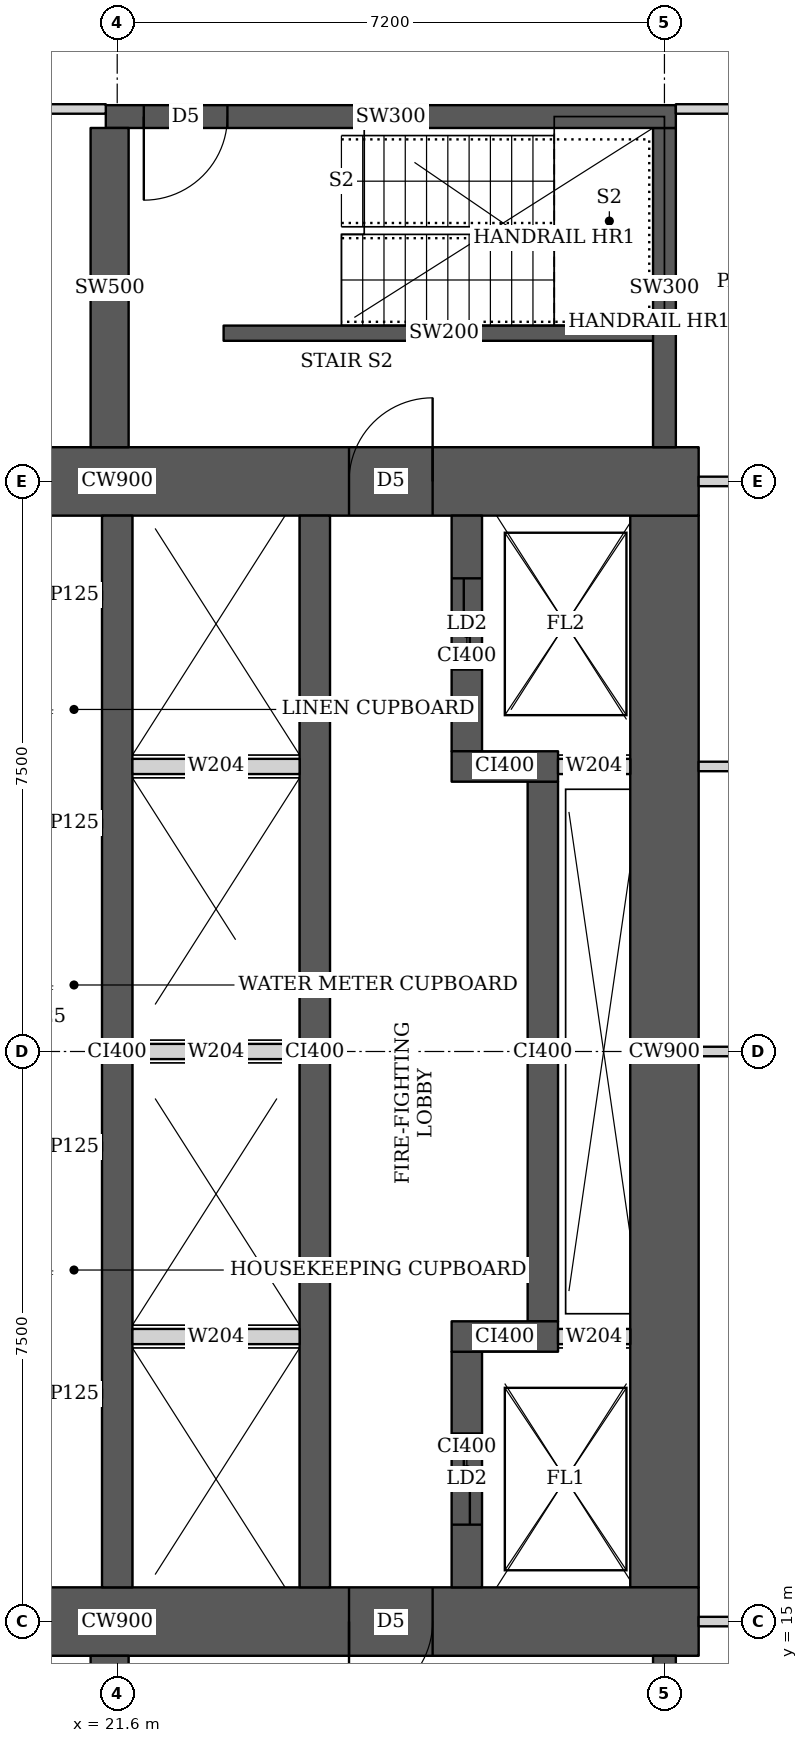
"""IFC4 building model, lengths in metres.
Left out: names, types, materials, properties, quantities, classifications, styles, units other than length and angle.
Written with IfcOpenShell. Run it as: python <this file> out.ifc"""

import sys

from ifc_helpers import new_model, si_unit, direction, frame, frame_2d, origin, place, context, subcontext, project, spatial, rectangle, extrude, element, fill, save


model = new_model("IFC4")
c1 = context("Model", 3, precision=1e-05, world=origin(), true_north=direction((0.0, 1.0)))
c2 = subcontext(c1, "Body", "Model", "MODEL_VIEW")
j1 = project(units=[si_unit("LENGTHUNIT", "METRE"), si_unit("PLANEANGLEUNIT", "RADIAN")], contexts=[c1])
p1 = place(None, origin())
s1 = spatial("IfcSite", under=j1, at=p1, CompositionType="ELEMENT")
p2 = place(p1, origin())
s2 = spatial("IfcBuilding", under=s1, at=p2, CompositionType="ELEMENT")
p3 = place(p2, frame((0.0, 0.0, 31.25)))
s3 = spatial("IfcBuildingStorey", under=s2, at=p3, CompositionType="ELEMENT", Elevation=31.25)
p4 = place(p3, frame((13.95, 15.0, 0.0), z_axis=(0.0, 0.0, 1.0), x_axis=(1.0, 0.0, 0.0)))
e1 = element("IfcWall", 1, at=p4, inside=s3, PredefinedType="SHEAR", context=c2, shape_type="SweptSolid", body=[
    extrude(rectangle(XDim=15.3, YDim=0.9, at=frame_2d((7.65, 0.0))), origin(), (0.0, 0.0, 1.0), 3.75),
])
p5 = place(p4, frame((4.45, 0.0, 0.0)))
e2 = element("IfcOpeningElement", 2, at=p5, cuts=e1, PredefinedType="OPENING", context=c2, shape_type="SweptSolid", body=[
    extrude(rectangle(XDim=1.8, YDim=2.1, at=frame_2d((0.9, 1.05))), frame((0.0, 0.46, 0.0), z_axis=(0.0, -1.0, 0.0), x_axis=(1.0, 0.0, 0.0)), (0.0, 0.0, 1.0), 0.92),
])
p6 = place(p4, frame((10.7, 0.0, 0.0)))
e3 = element("IfcOpeningElement", 3, at=p6, cuts=e1, PredefinedType="OPENING", context=c2, shape_type="SweptSolid", body=[
    extrude(rectangle(XDim=1.1, YDim=2.1, at=frame_2d((0.55, 1.05))), frame((0.0, 0.46, 0.0), z_axis=(0.0, -1.0, 0.0), x_axis=(1.0, 0.0, 0.0)), (0.0, 0.0, 1.0), 0.92),
])
p7 = place(p3, frame((13.95, 30.0, 0.0), z_axis=(0.0, 0.0, 1.0), x_axis=(1.0, 0.0, 0.0)))
e4 = element("IfcWall", 4, at=p7, inside=s3, PredefinedType="SHEAR", context=c2, shape_type="SweptSolid", body=[
    extrude(rectangle(XDim=15.3, YDim=0.9, at=frame_2d((7.65, 0.0))), origin(), (0.0, 0.0, 1.0), 3.75),
])
p8 = place(p7, frame((4.45, 0.0, 0.0)))
e5 = element("IfcOpeningElement", 5, at=p8, cuts=e4, PredefinedType="OPENING", context=c2, shape_type="SweptSolid", body=[
    extrude(rectangle(XDim=1.8, YDim=2.1, at=frame_2d((0.9, 1.05))), frame((0.0, 0.46, 0.0), z_axis=(0.0, -1.0, 0.0), x_axis=(1.0, 0.0, 0.0)), (0.0, 0.0, 1.0), 0.92),
])
p9 = place(p7, frame((10.7, 0.0, 0.0)))
e6 = element("IfcOpeningElement", 6, at=p9, cuts=e4, PredefinedType="OPENING", context=c2, shape_type="SweptSolid", body=[
    extrude(rectangle(XDim=1.1, YDim=2.1, at=frame_2d((0.55, 1.05))), frame((0.0, 0.46, 0.0), z_axis=(0.0, -1.0, 0.0), x_axis=(1.0, 0.0, 0.0)), (0.0, 0.0, 1.0), 0.92),
])
p10 = place(p3, frame((28.8, 15.45, 0.0), z_axis=(0.0, 0.0, 1.0), x_axis=(0.0, 1.0, 0.0)))
e7 = element("IfcWall", 7, at=p10, inside=s3, PredefinedType="SHEAR", context=c2, shape_type="SweptSolid", body=[
    extrude(rectangle(XDim=14.1, YDim=0.9, at=frame_2d((7.05, 0.0))), origin(), (0.0, 0.0, 1.0), 3.75),
])
for number, where, z_axis, x_axis in (
    (8, (21.6, 15.45, 0.0), (0.0, 0.0, 1.0), (0.0, 1.0, 0.0)),
    (9, (24.2, 15.45, 0.0), (0.0, 0.0, 1.0), (0.0, 1.0, 0.0)),
):
    element("IfcWall", number, at=place(p3, frame(where, z_axis=z_axis, x_axis=x_axis)), inside=s3, PredefinedType="SHEAR", context=c2, shape_type="SweptSolid", body=[
        extrude(rectangle(XDim=14.1, YDim=0.4, at=frame_2d((7.05, 0.0))), origin(), (0.0, 0.0, 1.0), 3.75),
    ])
p11 = place(p3, frame((26.2, 15.45, 0.0), z_axis=(0.0, 0.0, 1.0), x_axis=(0.0, 1.0, 0.0)))
e10 = element("IfcWall", 10, at=p11, inside=s3, PredefinedType="SHEAR", context=c2, shape_type="SweptSolid", body=[
    extrude(rectangle(XDim=3.1, YDim=0.4, at=frame_2d((1.55, 0.0))), origin(), (0.0, 0.0, 1.0), 3.75),
])
p12 = place(p11, frame((0.825, 0.0, 0.0)))
e11 = element("IfcOpeningElement", 11, at=p12, cuts=e10, PredefinedType="OPENING", context=c2, shape_type="SweptSolid", body=[
    extrude(rectangle(XDim=1.2, YDim=2.1, at=frame_2d((0.6, 1.05))), frame((0.0, 0.21, 0.0), z_axis=(0.0, -1.0, 0.0), x_axis=(1.0, 0.0, 0.0)), (0.0, 0.0, 1.0), 0.42),
])
p13 = place(p3, frame((26.0, 18.75, 0.0), z_axis=(0.0, 0.0, 1.0), x_axis=(1.0, 0.0, 0.0)))
e12 = element("IfcWall", 12, at=p13, inside=s3, PredefinedType="SHEAR", context=c2, shape_type="SweptSolid", body=[
    extrude(rectangle(XDim=1.4, YDim=0.4, at=frame_2d((0.7, 0.0))), origin(), (0.0, 0.0, 1.0), 3.75),
])
p14 = place(p3, frame((27.2, 18.95, 0.0), z_axis=(0.0, 0.0, 1.0), x_axis=(0.0, 1.0, 0.0)))
e13 = element("IfcWall", 13, at=p14, inside=s3, PredefinedType="SHEAR", context=c2, shape_type="SweptSolid", body=[
    extrude(rectangle(XDim=7.1, YDim=0.4, at=frame_2d((3.55, 0.0))), origin(), (0.0, 0.0, 1.0), 3.75),
])
p15 = place(p3, frame((26.0, 26.25, 0.0), z_axis=(0.0, 0.0, 1.0), x_axis=(1.0, 0.0, 0.0)))
e14 = element("IfcWall", 14, at=p15, inside=s3, PredefinedType="SHEAR", context=c2, shape_type="SweptSolid", body=[
    extrude(rectangle(XDim=1.4, YDim=0.4, at=frame_2d((0.7, 0.0))), origin(), (0.0, 0.0, 1.0), 3.75),
])
p16 = place(p3, frame((26.2, 26.45, 0.0), z_axis=(0.0, 0.0, 1.0), x_axis=(0.0, 1.0, 0.0)))
e15 = element("IfcWall", 15, at=p16, inside=s3, PredefinedType="SHEAR", context=c2, shape_type="SweptSolid", body=[
    extrude(rectangle(XDim=3.1, YDim=0.4, at=frame_2d((1.55, 0.0))), origin(), (0.0, 0.0, 1.0), 3.75),
])
p17 = place(p16, frame((1.075, 0.0, 0.0)))
e16 = element("IfcOpeningElement", 16, at=p17, cuts=e15, PredefinedType="OPENING", context=c2, shape_type="SweptSolid", body=[
    extrude(rectangle(XDim=1.2, YDim=2.1, at=frame_2d((0.6, 1.05))), frame((0.0, 0.21, 0.0), z_axis=(0.0, -1.0, 0.0), x_axis=(1.0, 0.0, 0.0)), (0.0, 0.0, 1.0), 0.42),
])
p18 = place(p3, frame((21.5, 10.35, 0.0), z_axis=(0.0, 0.0, 1.0), x_axis=(0.0, 1.0, 0.0)))
e17 = element("IfcWall", 17, at=p18, inside=s3, PredefinedType="SHEAR", context=c2, shape_type="SweptSolid", body=[
    extrude(rectangle(XDim=4.2, YDim=0.5, at=frame_2d((2.1, 0.0))), origin(), (0.0, 0.0, 1.0), 3.75),
])
p19 = place(p3, frame((28.8, 10.35, 0.0), z_axis=(0.0, 0.0, 1.0), x_axis=(0.0, 1.0, 0.0)))
e18 = element("IfcWall", 18, at=p19, inside=s3, PredefinedType="SHEAR", context=c2, shape_type="SweptSolid", body=[
    extrude(rectangle(XDim=4.2, YDim=0.3, at=frame_2d((2.1, 0.0))), origin(), (0.0, 0.0, 1.0), 3.75),
])
p20 = place(p3, frame((21.45, 34.8, 0.0), z_axis=(0.0, 0.0, 1.0), x_axis=(1.0, 0.0, 0.0)))
e19 = element("IfcWall", 19, at=p20, inside=s3, PredefinedType="SHEAR", context=c2, shape_type="SweptSolid", body=[
    extrude(rectangle(XDim=7.5, YDim=0.3, at=frame_2d((3.75, 0.0))), origin(), (0.0, 0.0, 1.0), 3.75),
])
p21 = place(p20, frame((0.5, 0.0, 0.0)))
e20 = element("IfcOpeningElement", 20, at=p21, cuts=e19, PredefinedType="OPENING", context=c2, shape_type="SweptSolid", body=[
    extrude(rectangle(XDim=1.1, YDim=2.1, at=frame_2d((0.55, 1.05))), frame((0.0, 0.16, 0.0), z_axis=(0.0, -1.0, 0.0), x_axis=(1.0, 0.0, 0.0)), (0.0, 0.0, 1.0), 0.32),
])
p22 = place(p3, frame((21.5, 30.45, 0.0), z_axis=(0.0, 0.0, 1.0), x_axis=(0.0, 1.0, 0.0)))
e21 = element("IfcWall", 21, at=p22, inside=s3, PredefinedType="SHEAR", context=c2, shape_type="SweptSolid", body=[
    extrude(rectangle(XDim=4.2, YDim=0.5, at=frame_2d((2.1, 0.0))), origin(), (0.0, 0.0, 1.0), 3.75),
])
p23 = place(p3, frame((28.8, 30.45, 0.0), z_axis=(0.0, 0.0, 1.0), x_axis=(0.0, 1.0, 0.0)))
e22 = element("IfcWall", 22, at=p23, inside=s3, PredefinedType="SHEAR", context=c2, shape_type="SweptSolid", body=[
    extrude(rectangle(XDim=4.2, YDim=0.3, at=frame_2d((2.1, 0.0))), origin(), (0.0, 0.0, 1.0), 3.75),
])
p24 = place(p3, frame((10.163, 34.9, 0.0), z_axis=(0.0, 0.0, 1.0), x_axis=(1.0, 0.0, 0.0)))
e23 = element("IfcWall", 23, at=p24, inside=s3, PredefinedType="PARTITIONING", context=c2, shape_type="SweptSolid", body=[
    extrude(rectangle(XDim=11.287, YDim=0.125, at=frame_2d((5.644, 0.0))), origin(), (0.0, 0.0, 1.0), 3.5),
])
p25 = place(p24, frame((7.737, 0.0, 0.0)))
e24 = element("IfcOpeningElement", 24, at=p25, cuts=e23, PredefinedType="OPENING", context=c2, shape_type="SweptSolid", body=[
    extrude(rectangle(XDim=1.8, YDim=2.1, at=frame_2d((0.9, 1.05))), frame((0.0, 0.073, 0.0), z_axis=(0.0, -1.0, 0.0), x_axis=(1.0, 0.0, 0.0)), (0.0, 0.0, 1.0), 0.145),
])
p26 = place(p3, frame((28.95, 34.9, 0.0), z_axis=(0.0, 0.0, 1.0), x_axis=(1.0, 0.0, 0.0)))
e25 = element("IfcWall", 25, at=p26, inside=s3, PredefinedType="PARTITIONING", context=c2, shape_type="SweptSolid", body=[
    extrude(rectangle(XDim=4.588, YDim=0.125, at=frame_2d((2.294, 0.0))), origin(), (0.0, 0.0, 1.0), 3.5),
])
p27 = place(p3, frame((29.25, 15.0, 0.0), z_axis=(0.0, 0.0, 1.0), x_axis=(1.0, 0.0, 0.0)))
e26 = element("IfcWall", 26, at=p27, inside=s3, PredefinedType="PARTITIONING", context=c2, shape_type="SweptSolid", body=[
    extrude(rectangle(XDim=5.849, YDim=0.125, at=frame_2d((2.925, 0.0))), origin(), (0.0, 0.0, 1.0), 3.5),
])
p28 = place(p3, frame((29.25, 22.5, 0.0), z_axis=(0.0, 0.0, 1.0), x_axis=(1.0, 0.0, 0.0)))
e27 = element("IfcWall", 27, at=p28, inside=s3, PredefinedType="PARTITIONING", context=c2, shape_type="SweptSolid", body=[
    extrude(rectangle(XDim=2.849, YDim=0.125, at=frame_2d((1.425, 0.0))), origin(), (0.0, 0.0, 1.0), 3.5),
])
p29 = place(p3, frame((29.25, 26.25, 0.0), z_axis=(0.0, 0.0, 1.0), x_axis=(1.0, 0.0, 0.0)))
e28 = element("IfcWall", 28, at=p29, inside=s3, PredefinedType="PARTITIONING", context=c2, shape_type="SweptSolid", body=[
    extrude(rectangle(XDim=5.838, YDim=0.125, at=frame_2d((2.919, 0.0))), origin(), (0.0, 0.0, 1.0), 3.5),
])
p30 = place(p3, frame((29.25, 30.0, 0.0), z_axis=(0.0, 0.0, 1.0), x_axis=(1.0, 0.0, 0.0)))
e29 = element("IfcWall", 29, at=p30, inside=s3, PredefinedType="PARTITIONING", context=c2, shape_type="SweptSolid", body=[
    extrude(rectangle(XDim=2.849, YDim=0.125, at=frame_2d((1.425, 0.0))), origin(), (0.0, 0.0, 1.0), 3.5),
])
for number, where, z_axis, x_axis in (
    (30, (20.663, 18.0, 0.0), (0.0, 0.0, 1.0), (1.0, 0.0, 0.0)),
    (31, (20.663, 28.5, 0.0), (0.0, 0.0, 1.0), (1.0, 0.0, 0.0)),
    (32, (20.663, 21.25, 0.0), (0.0, 0.0, 1.0), (1.0, 0.0, 0.0)),
    (33, (20.663, 25.5, 0.0), (0.0, 0.0, 1.0), (1.0, 0.0, 0.0)),
):
    element("IfcWall", number, at=place(p3, frame(where, z_axis=z_axis, x_axis=x_axis)), inside=s3, PredefinedType="PARTITIONING", context=c2, shape_type="SweptSolid", body=[
        extrude(rectangle(XDim=0.737, YDim=0.125, at=frame_2d((0.368, 0.0))), origin(), (0.0, 0.0, 1.0), 3.5),
    ])
p31 = place(p3, frame((23.0, 31.95, 0.0), z_axis=(0.0, 0.0, 1.0), x_axis=(1.0, 0.0, 0.0)))
e34 = element("IfcWall", 34, at=p31, inside=s3, PredefinedType="SHEAR", context=c2, shape_type="SweptSolid", body=[
    extrude(rectangle(XDim=5.8, YDim=0.2, at=frame_2d((2.9, 0.0))), origin(), (0.0, 0.0, 1.0), 3.75),
])
for number, where, z_axis, x_axis in (
    (35, (21.8, 18.75, 0.0), (0.0, 0.0, 1.0), (1.0, 0.0, 0.0)),
    (36, (21.8, 22.5, 0.0), (0.0, 0.0, 1.0), (1.0, 0.0, 0.0)),
    (37, (21.8, 26.25, 0.0), (0.0, 0.0, 1.0), (1.0, 0.0, 0.0)),
):
    element("IfcWall", number, at=place(p3, frame(where, z_axis=z_axis, x_axis=x_axis)), inside=s3, PredefinedType="SOLIDWALL", context=c2, shape_type="SweptSolid", body=[
        extrude(rectangle(XDim=2.2, YDim=0.2, at=frame_2d((1.1, 0.0))), origin(), (0.0, 0.0, 1.0), 3.5),
    ])
for number, where, z_axis, x_axis in (
    (38, (27.4, 18.75, 0.0), (0.0, 0.0, 1.0), (1.0, 0.0, 0.0)),
    (39, (27.4, 26.25, 0.0), (0.0, 0.0, 1.0), (1.0, 0.0, 0.0)),
):
    element("IfcWall", number, at=place(p3, frame(where, z_axis=z_axis, x_axis=x_axis)), inside=s3, PredefinedType="SOLIDWALL", context=c2, shape_type="SweptSolid", body=[
        extrude(rectangle(XDim=0.95, YDim=0.2, at=frame_2d((0.475, 0.0))), origin(), (0.0, 0.0, 1.0), 3.5),
    ])
p32 = place(p6, origin())
e40 = element("IfcDoor", 40, at=p32, inside=s3, OperationType="SINGLE_SWING_RIGHT", PredefinedType="DOOR", context=c2, shape_type="SweptSolid", body=[
    extrude(rectangle(XDim=1.1, YDim=2.1, at=frame_2d((0.55, 1.05))), frame((0.0, 0.025, 0.0), z_axis=(0.0, -1.0, 0.0), x_axis=(1.0, 0.0, 0.0)), (0.0, 0.0, 1.0), 0.05),
])
fill(e3, e40)
p33 = place(p9, origin())
e41 = element("IfcDoor", 41, at=p33, inside=s3, OperationType="SINGLE_SWING_RIGHT", PredefinedType="DOOR", context=c2, shape_type="SweptSolid", body=[
    extrude(rectangle(XDim=1.1, YDim=2.1, at=frame_2d((0.55, 1.05))), frame((0.0, 0.025, 0.0), z_axis=(0.0, -1.0, 0.0), x_axis=(1.0, 0.0, 0.0)), (0.0, 0.0, 1.0), 0.05),
])
fill(e6, e41)
p34 = place(p12, origin())
e42 = element("IfcDoor", 42, at=p34, inside=s3, OperationType="DOUBLE_DOOR_SLIDING", PredefinedType="DOOR", context=c2, shape_type="SweptSolid", body=[
    extrude(rectangle(XDim=1.2, YDim=2.1, at=frame_2d((0.6, 1.05))), frame((0.0, 0.025, 0.0), z_axis=(0.0, -1.0, 0.0), x_axis=(1.0, 0.0, 0.0)), (0.0, 0.0, 1.0), 0.05),
])
fill(e11, e42)
p35 = place(p17, origin())
e43 = element("IfcDoor", 43, at=p35, inside=s3, OperationType="DOUBLE_DOOR_SLIDING", PredefinedType="DOOR", context=c2, shape_type="SweptSolid", body=[
    extrude(rectangle(XDim=1.2, YDim=2.1, at=frame_2d((0.6, 1.05))), frame((0.0, 0.025, 0.0), z_axis=(0.0, -1.0, 0.0), x_axis=(1.0, 0.0, 0.0)), (0.0, 0.0, 1.0), 0.05),
])
fill(e16, e43)
p36 = place(p21, origin())
e44 = element("IfcDoor", 44, at=p36, inside=s3, OperationType="SINGLE_SWING_RIGHT", PredefinedType="DOOR", context=c2, shape_type="SweptSolid", body=[
    extrude(rectangle(XDim=1.1, YDim=2.1, at=frame_2d((0.55, 1.05))), frame((0.0, 0.025, 0.0), z_axis=(0.0, -1.0, 0.0), x_axis=(1.0, 0.0, 0.0)), (0.0, 0.0, 1.0), 0.05),
])
fill(e20, e44)
save(model, sys.argv[1])
